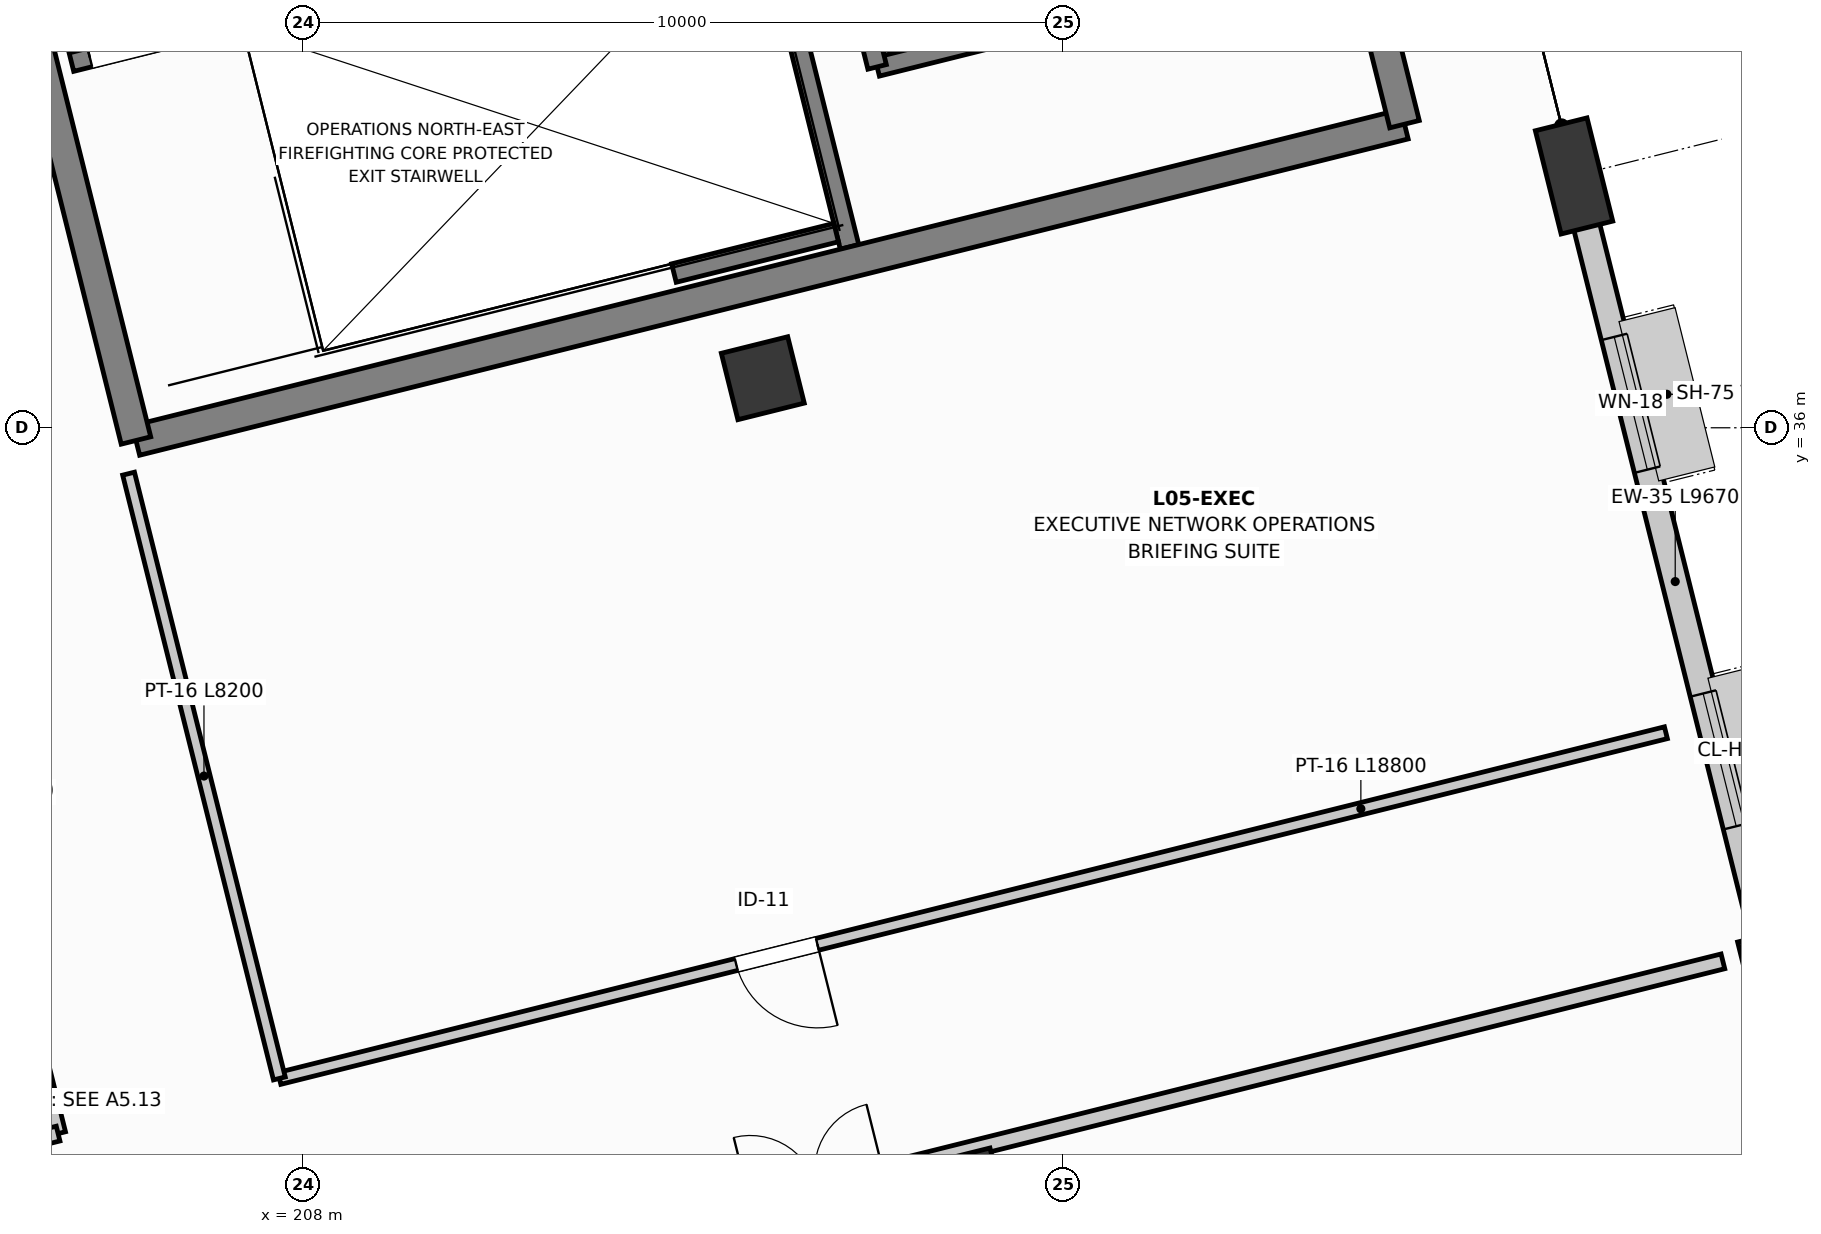
"""IFC4 building model, lengths in metres.
Left out: names, types, materials, properties, quantities, classifications, styles, units other than length and angle.
Written with IfcOpenShell. Run it as: python <this file> out.ifc"""

import sys

from ifc_helpers import new_model, si_unit, direction, frame, frame_2d, origin, origin_2d, place, context, subcontext, project, spatial, rectangle, extrude, element, fill, save


model = new_model("IFC4")
c1 = context("Model", 3, precision=1e-05, world=origin(), true_north=direction((0.0, 1.0)))
c2 = subcontext(c1, "Body", "Model", "MODEL_VIEW")
j1 = project(units=[si_unit("LENGTHUNIT", "METRE"), si_unit("PLANEANGLEUNIT", "RADIAN")], contexts=[c1])
p1 = place(None, origin())
s1 = spatial("IfcSite", under=j1, at=p1, CompositionType="ELEMENT")
p2 = place(p1, origin())
s2 = spatial("IfcBuilding", under=s1, at=p2, CompositionType="ELEMENT")
p3 = place(p2, frame((0.0, 0.0, 24.6)))
s3 = spatial("IfcBuildingStorey", under=s2, at=p3, CompositionType="ELEMENT", Elevation=24.6)
for number, where, z_axis, x_axis in (
    (1, (216.705, 25.979, 0.0), (0.0, 0.0, 1.0), (0.97, 0.242, 0.0)),
    (2, (214.044, 36.652, 0.0), (0.0, 0.0, 1.0), (0.97, 0.242, 0.0)),
):
    element("IfcColumn", number, at=place(p3, frame(where, z_axis=z_axis, x_axis=x_axis)), inside=s3, PredefinedType="COLUMN", context=c2, shape_type="SweptSolid", body=[
        extrude(rectangle(XDim=0.9, YDim=0.9, at=origin_2d()), origin(), (0.0, 0.0, 1.0), 4.2),
    ])
for number, where, z_axis, x_axis in (
    (3, (227.378, 28.64, 0.0), (0.0, 0.0, 1.0), (0.97, 0.242, 0.0)),
    (4, (224.717, 39.313, 0.0), (0.0, 0.0, 1.0), (0.97, 0.242, 0.0)),
):
    element("IfcColumn", number, at=place(p3, frame(where, z_axis=z_axis, x_axis=x_axis)), inside=s3, PredefinedType="COLUMN", context=c2, shape_type="SweptSolid", body=[
        extrude(rectangle(XDim=0.7, YDim=1.4, at=origin_2d()), origin(), (0.0, 0.0, 1.0), 4.2),
    ])
p4 = place(p3, frame((227.218, 29.285, 0.0), z_axis=(0.0, 0.0, 1.0), x_axis=(-0.241919949636, 0.970296211457, 0.0)))
e5 = element("IfcWall", 5, at=p4, inside=s3, PredefinedType="STANDARD", context=c2, shape_type="SweptSolid", body=[
    extrude(rectangle(XDim=9.67, YDim=0.35, at=frame_2d((4.835, 0.0))), origin(), (0.0, 0.0, 1.0), 3.575),
])
p5 = place(p4, frame((1.517, 0.0, 0.85)))
e6 = element("IfcOpeningElement", 6, at=p5, cuts=e5, PredefinedType="OPENING", context=c2, shape_type="SweptSolid", body=[
    extrude(rectangle(XDim=1.8, YDim=1.65, at=frame_2d((0.9, 0.825))), frame((0.0, 0.185, 0.0), z_axis=(0.0, -1.0, 0.0), x_axis=(1.0, 0.0, 0.0)), (0.0, 0.0, 1.0), 0.37),
])
p6 = place(p4, frame((6.352, 0.0, 0.85)))
e7 = element("IfcOpeningElement", 7, at=p6, cuts=e5, PredefinedType="OPENING", context=c2, shape_type="SweptSolid", body=[
    extrude(rectangle(XDim=1.8, YDim=1.65, at=frame_2d((0.9, 0.825))), frame((0.0, 0.185, 0.0), z_axis=(0.0, -1.0, 0.0), x_axis=(1.0, 0.0, 0.0)), (0.0, 0.0, 1.0), 0.37),
])
p7 = place(p3, frame((215.548, 40.748, 0.0), z_axis=(0.0, 0.0, 1.0), x_axis=(0.97029284861, 0.241933436994, 0.0)))
e8 = element("IfcWall", 8, at=p7, inside=s3, PredefinedType="SOLIDWALL", context=c2, shape_type="SweptSolid", body=[
    extrude(rectangle(XDim=2.54, YDim=0.25, at=frame_2d((1.27, 0.0))), origin(), (0.0, 0.0, 1.0), 3.98),
])
p8 = place(p3, frame((214.909, 43.309, 0.0), z_axis=(0.0, 0.0, 1.0), x_axis=(0.241938414856, -0.970291607413, 0.0)))
e9 = element("IfcWall", 9, at=p8, inside=s3, PredefinedType="SOLIDWALL", context=c2, shape_type="SweptSolid", body=[
    extrude(rectangle(XDim=2.64, YDim=0.25, at=frame_2d((1.32, 0.0))), origin(), (0.0, 0.0, 1.0), 3.98),
])
p9 = place(p3, frame((204.948, 40.81, 0.0), z_axis=(0.0, 0.0, 1.0), x_axis=(0.970297151331, 0.241916179943, 0.0)))
e10 = element("IfcWall", 10, at=p9, inside=s3, PredefinedType="SOLIDWALL", context=c2, shape_type="SweptSolid", body=[
    extrude(rectangle(XDim=9.345, YDim=0.25, at=frame_2d((4.673, 0.0))), origin(), (0.0, 0.0, 1.0), 3.98),
])
p10 = place(p9, frame((0.25, 0.0, 0.0)))
e11 = element("IfcOpeningElement", 11, at=p10, cuts=e10, PredefinedType="OPENING", context=c2, shape_type="SweptSolid", body=[
    extrude(rectangle(XDim=1.8, YDim=2.25, at=frame_2d((0.9, 1.125))), frame((0.0, 0.135, 0.0), z_axis=(0.0, -1.0, 0.0), x_axis=(1.0, 0.0, 0.0)), (0.0, 0.0, 1.0), 0.27),
])
p11 = place(p3, frame((215.185, 38.38, 0.0), z_axis=(0.0, 0.0, 1.0), x_axis=(-0.241911120435, 0.970298412763, 0.0)))
e12 = element("IfcWall", 12, at=p11, inside=s3, PredefinedType="SOLIDWALL", context=c2, shape_type="SweptSolid", body=[
    extrude(rectangle(XDim=4.71, YDim=0.25, at=frame_2d((2.355, 0.0))), origin(), (0.0, 0.0, 1.0), 3.98),
])
p12 = place(p3, frame((212.875, 38.035, 0.0), z_axis=(0.0, 0.0, 1.0), x_axis=(0.97029738597, 0.241915238833, 0.0)))
e13 = element("IfcWall", 13, at=p12, inside=s3, PredefinedType="SOLIDWALL", context=c2, shape_type="SweptSolid", body=[
    extrude(rectangle(XDim=2.2, YDim=0.25, at=frame_2d((1.1, 0.0))), origin(), (0.0, 0.0, 1.0), 3.98),
])
p13 = place(p3, frame((205.797, 35.833, 0.0), z_axis=(0.0, 0.0, 1.0), x_axis=(0.970295179998, 0.241924086589, 0.0)))
e14 = element("IfcWall", 14, at=p13, inside=s3, PredefinedType="SHEAR", context=c2, shape_type="SweptSolid", body=[
    extrude(rectangle(XDim=17.2, YDim=0.4, at=frame_2d((8.6, 0.0))), origin(), (0.0, 0.0, 1.0), 3.98),
])
p14 = place(p3, frame((222.486, 39.994, 0.0), z_axis=(0.0, 0.0, 1.0), x_axis=(-0.241923808098, 0.970295249435, 0.0)))
e15 = element("IfcWall", 15, at=p14, inside=s3, PredefinedType="SHEAR", context=c2, shape_type="SweptSolid", body=[
    extrude(rectangle(XDim=9.0, YDim=0.4, at=frame_2d((4.5, 0.0))), origin(), (0.0, 0.0, 1.0), 3.98),
])
p15 = place(p3, frame((203.62, 44.566, 0.0), z_axis=(0.0, 0.0, 1.0), x_axis=(0.241921199913, -0.97029589973, 0.0)))
e16 = element("IfcWall", 16, at=p15, inside=s3, PredefinedType="SHEAR", context=c2, shape_type="SweptSolid", body=[
    extrude(rectangle(XDim=9.0, YDim=0.4, at=frame_2d((4.5, 0.0))), origin(), (0.0, 0.0, 1.0), 3.98),
])
p16 = place(p3, frame((210.762, 25.013, 0.0), z_axis=(0.0, 0.0, 1.0), x_axis=(0.970295821368, 0.241921514207, 0.0)))
e17 = element("IfcWall", 17, at=p16, inside=s3, PredefinedType="PARTITIONING", context=c2, shape_type="SweptSolid", body=[
    extrude(rectangle(XDim=16.4, YDim=0.2, at=frame_2d((8.2, 0.0))), origin(), (0.0, 0.0, 1.0), 3.225),
])
p17 = place(p16, frame((3.212, 0.0, 0.0)))
e18 = element("IfcOpeningElement", 18, at=p17, cuts=e17, PredefinedType="OPENING", context=c2, shape_type="SweptSolid", body=[
    extrude(rectangle(XDim=1.8, YDim=2.25, at=frame_2d((0.9, 1.125))), frame((0.0, 0.11, 0.0), z_axis=(0.0, -1.0, 0.0), x_axis=(1.0, 0.0, 0.0)), (0.0, 0.0, 1.0), 0.22),
])
p18 = place(p3, frame((225.925, 31.988, 0.0), z_axis=(0.0, 0.0, 1.0), x_axis=(-0.970296246895, -0.241919807501, 0.0)))
e19 = element("IfcWall", 19, at=p18, inside=s3, PredefinedType="PARTITIONING", context=c2, shape_type="SweptSolid", body=[
    extrude(rectangle(XDim=18.8, YDim=0.16, at=frame_2d((9.4, 0.0))), origin(), (0.0, 0.0, 1.0), 3.225),
])
p19 = place(p18, frame((11.505, 0.0, 0.0)))
e20 = element("IfcOpeningElement", 20, at=p19, cuts=e19, PredefinedType="OPENING", context=c2, shape_type="SweptSolid", body=[
    extrude(rectangle(XDim=1.1, YDim=2.2, at=frame_2d((0.55, 1.1))), frame((0.0, 0.09, 0.0), z_axis=(0.0, -1.0, 0.0), x_axis=(1.0, 0.0, 0.0)), (0.0, 0.0, 1.0), 0.18),
])
p20 = place(p3, frame((207.684, 27.44, 0.0), z_axis=(0.0, 0.0, 1.0), x_axis=(-0.241915773481, 0.970297252671, 0.0)))
e21 = element("IfcWall", 21, at=p20, inside=s3, PredefinedType="PARTITIONING", context=c2, shape_type="SweptSolid", body=[
    extrude(rectangle(XDim=8.2, YDim=0.16, at=frame_2d((4.1, 0.0))), origin(), (0.0, 0.0, 1.0), 3.225),
])
p21 = place(p3, frame((203.079, 33.506, 0.0), z_axis=(0.0, 0.0, 1.0), x_axis=(0.241913727906, -0.970297762674, 0.0)))
e22 = element("IfcWall", 22, at=p21, inside=s3, PredefinedType="PARTITIONING", context=c2, shape_type="SweptSolid", body=[
    extrude(rectangle(XDim=7.0, YDim=0.2, at=frame_2d((3.5, 0.0))), origin(), (0.0, 0.0, 1.0), 3.225),
])
p22 = place(p3, frame((204.773, 26.714, 0.0), z_axis=(0.0, 0.0, 1.0), x_axis=(-0.970295576517, -0.241922496248, 0.0)))
e23 = element("IfcWall", 23, at=p22, inside=s3, PredefinedType="PARTITIONING", context=c2, shape_type="SweptSolid", body=[
    extrude(rectangle(XDim=32.2, YDim=0.2, at=frame_2d((16.1, 0.0))), origin(), (0.0, 0.0, 1.0), 3.225),
])
p23 = place(p22, frame((15.2, 0.0, 0.0)))
e24 = element("IfcOpeningElement", 24, at=p23, cuts=e23, PredefinedType="OPENING", context=c2, shape_type="SweptSolid", body=[
    extrude(rectangle(XDim=1.8, YDim=2.25, at=frame_2d((0.9, 1.125))), frame((0.0, 0.11, 0.0), z_axis=(0.0, -1.0, 0.0), x_axis=(1.0, 0.0, 0.0)), (0.0, 0.0, 1.0), 0.22),
])
p24 = place(p5, origin())
e25 = element("IfcWindow", 25, at=p24, inside=s3, PartitioningType="SINGLE_PANEL", PredefinedType="WINDOW", context=c2, shape_type="SweptSolid", body=[
    extrude(rectangle(XDim=1.8, YDim=1.65, at=frame_2d((0.9, 0.825))), frame((0.0, 0.03, 0.0), z_axis=(0.0, -1.0, 0.0), x_axis=(1.0, 0.0, 0.0)), (0.0, 0.0, 1.0), 0.06),
])
fill(e6, e25)
p25 = place(p6, origin())
e26 = element("IfcWindow", 26, at=p25, inside=s3, PartitioningType="SINGLE_PANEL", PredefinedType="WINDOW", context=c2, shape_type="SweptSolid", body=[
    extrude(rectangle(XDim=1.8, YDim=1.65, at=frame_2d((0.9, 0.825))), frame((0.0, 0.03, 0.0), z_axis=(0.0, -1.0, 0.0), x_axis=(1.0, 0.0, 0.0)), (0.0, 0.0, 1.0), 0.06),
])
fill(e7, e26)
p26 = place(p10, origin())
e27 = element("IfcDoor", 27, at=p26, inside=s3, OperationType="DOUBLE_DOOR_SINGLE_SWING", PredefinedType="DOOR", context=c2, shape_type="SweptSolid", body=[
    extrude(rectangle(XDim=1.8, YDim=2.25, at=frame_2d((0.9, 1.125))), frame((0.0, 0.025, 0.0), z_axis=(0.0, -1.0, 0.0), x_axis=(1.0, 0.0, 0.0)), (0.0, 0.0, 1.0), 0.05),
])
fill(e11, e27)
p27 = place(p19, origin())
e28 = element("IfcDoor", 28, at=p27, inside=s3, OperationType="SINGLE_SWING_LEFT", PredefinedType="DOOR", context=c2, shape_type="SweptSolid", body=[
    extrude(rectangle(XDim=1.1, YDim=2.2, at=frame_2d((0.55, 1.1))), frame((0.0, 0.025, 0.0), z_axis=(0.0, -1.0, 0.0), x_axis=(1.0, 0.0, 0.0)), (0.0, 0.0, 1.0), 0.05),
])
fill(e20, e28)
save(model, sys.argv[1])
